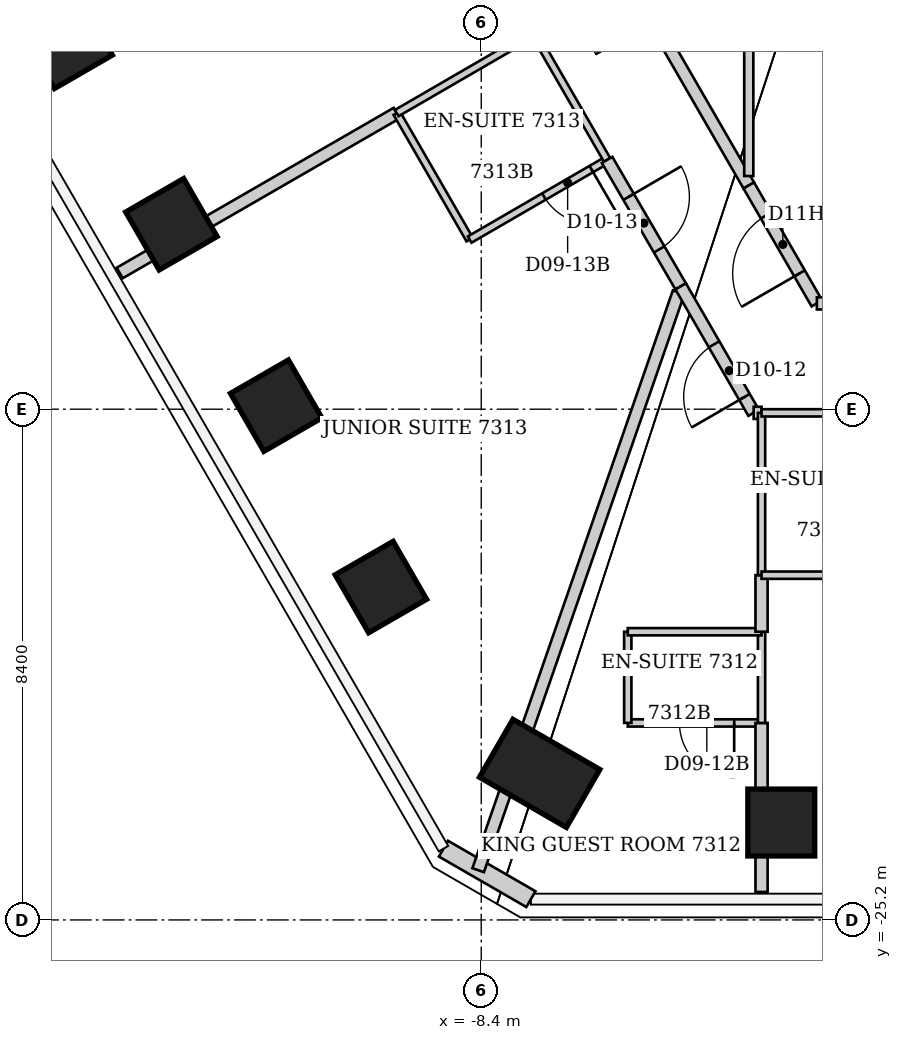
"""IFC4 building model, lengths in metres.
Left out: names, types, materials, properties, quantities, classifications, styles, units other than length and angle.
Written with IfcOpenShell. Run it as: python <this file> out.ifc"""

import sys

from ifc_helpers import new_model, si_unit, direction, frame, frame_2d, origin, origin_2d, place, context, subcontext, project, spatial, rectangle, extrude, element, fill, save


model = new_model("IFC4")
c1 = context("Model", 3, precision=1e-05, world=origin(), true_north=direction((0.0, 1.0)))
c2 = subcontext(c1, "Body", "Model", "MODEL_VIEW")
j1 = project(units=[si_unit("LENGTHUNIT", "METRE"), si_unit("PLANEANGLEUNIT", "RADIAN")], contexts=[c1])
p1 = place(None, origin())
s1 = spatial("IfcSite", under=j1, at=p1, CompositionType="ELEMENT")
p2 = place(p1, origin())
s2 = spatial("IfcBuilding", under=s1, at=p2, CompositionType="ELEMENT")
p3 = place(p2, frame((0.0, 0.0, 291.2)))
s3 = spatial("IfcBuildingStorey", under=s2, at=p3, CompositionType="ELEMENT", Elevation=291.2)
p4 = place(p3, frame((-3.466, -23.598, 0.0), z_axis=(0.0, 0.0, 1.0), x_axis=(0.0, -1.0, 0.0)))
e1 = element("IfcColumn", 1, at=p4, inside=s3, PredefinedType="COLUMN", context=c2, shape_type="SweptSolid", body=[
    extrude(rectangle(XDim=1.1, YDim=1.1, at=origin_2d()), origin(), (0.0, 0.0, 1.0), 3.8),
])
p5 = place(p3, frame((-7.439, -22.79, 0.0), z_axis=(0.0, 0.0, 1.0), x_axis=(-0.5, -0.866025403784, 0.0)))
e2 = element("IfcColumn", 2, at=p5, inside=s3, PredefinedType="COLUMN", context=c2, shape_type="SweptSolid", body=[
    extrude(rectangle(XDim=1.1, YDim=1.65, at=origin_2d()), origin(), (0.0, 0.0, 1.0), 3.8),
])
for number, where, z_axis, x_axis in (
    (3, (-10.05, -19.725, 0.0), (0.0, 0.0, 1.0), (-0.866, -0.5, 0.0)),
    (4, (-11.773, -16.742, 0.0), (0.0, 0.0, 1.0), (-0.866, -0.5, 0.0)),
    (5, (-13.495, -13.759, 0.0), (0.0, 0.0, 1.0), (-0.866, -0.5, 0.0)),
    (6, (-15.218, -10.775, 0.0), (0.0, 0.0, 1.0), (-0.866, -0.5, 0.0)),
):
    element("IfcColumn", number, at=place(p3, frame(where, z_axis=z_axis, x_axis=x_axis)), inside=s3, PredefinedType="COLUMN", context=c2, shape_type="SweptSolid", body=[
        extrude(rectangle(XDim=1.1, YDim=1.1, at=origin_2d()), origin(), (0.0, 0.0, 1.0), 3.8),
    ])
p6 = place(p3, frame((-7.583, -24.858, 0.0), z_axis=(0.0, 0.0, 1.0), x_axis=(-0.865989634427, 0.500061949227, 0.0)))
e7 = element("IfcWall", 7, at=p6, inside=s3, PredefinedType="SOLIDWALL", context=c2, shape_type="SweptSolid", body=[
    extrude(rectangle(XDim=1.66, YDim=0.3, at=frame_2d((0.83, 0.0))), origin(), (0.0, 0.0, 1.0), 3.64),
])
p7 = place(p3, frame((-14.346, -14.56, 0.0), z_axis=(0.0, 0.0, 1.0), x_axis=(0.8660557602, 0.49994741746, 0.0)))
e8 = element("IfcWall", 8, at=p7, inside=s3, PredefinedType="PARTITIONING", context=c2, shape_type="SweptSolid", body=[
    extrude(rectangle(XDim=5.261, YDim=0.2, at=frame_2d((2.63, 0.0))), origin(), (0.0, 0.0, 1.0), 3.64),
])
p8 = place(p3, frame((-9.79, -11.93, 0.0), z_axis=(0.0, 0.0, 1.0), x_axis=(0.499693115345, -0.866202511239, 0.0)))
e9 = element("IfcWall", 9, at=p8, inside=s3, PredefinedType="PARTITIONING", context=c2, shape_type="SweptSolid", body=[
    extrude(rectangle(XDim=2.401, YDim=0.12, at=frame_2d((1.201, 0.0))), origin(), (0.0, 0.0, 1.0), 3.64),
])
p9 = place(p3, frame((-9.79, -11.93, 0.0), z_axis=(0.0, 0.0, 1.0), x_axis=(0.865195830568, 0.501434118073, 0.0)))
e10 = element("IfcWall", 10, at=p9, inside=s3, PredefinedType="PARTITIONING", context=c2, shape_type="SweptSolid", body=[
    extrude(rectangle(XDim=2.612, YDim=0.12, at=frame_2d((1.306, 0.0))), origin(), (0.0, 0.0, 1.0), 3.64),
])
p10 = place(p3, frame((-8.59, -14.01, 0.0), z_axis=(0.0, 0.0, 1.0), x_axis=(0.865155281359, 0.50150407689, 0.0)))
e11 = element("IfcWall", 11, at=p10, inside=s3, PredefinedType="PARTITIONING", context=c2, shape_type="SweptSolid", body=[
    extrude(rectangle(XDim=2.612, YDim=0.12, at=frame_2d((1.306, 0.0))), origin(), (0.0, 0.0, 1.0), 3.64),
])
p11 = place(p10, frame((1.412, 0.0, 0.0)))
e12 = element("IfcOpeningElement", 12, at=p11, cuts=e11, PredefinedType="OPENING", context=c2, shape_type="SweptSolid", body=[
    extrude(rectangle(XDim=0.9, YDim=2.03, at=frame_2d((0.45, 1.015))), frame((0.0, 0.06, 0.0), z_axis=(0.0, -1.0, 0.0), x_axis=(1.0, 0.0, 0.0)), (0.0, 0.0, 1.0), 0.12),
])
p12 = place(p3, frame((-8.45, -24.382, 0.0), z_axis=(0.0, 0.0, 1.0), x_axis=(0.327695764917, 0.944783300898, 0.0)))
e13 = element("IfcWall", 13, at=p12, inside=s3, PredefinedType="PARTITIONING", context=c2, shape_type="SweptSolid", body=[
    extrude(rectangle(XDim=10.058, YDim=0.2, at=frame_2d((5.029, 0.0))), origin(), (0.0, 0.0, 1.0), 3.64),
])
p13 = place(p3, frame((-7.53, -10.62, 0.0), z_axis=(0.0, 0.0, 1.0), x_axis=(0.499737123639, -0.866177122335, 0.0)))
e14 = element("IfcWall", 14, at=p13, inside=s3, PredefinedType="PARTITIONING", context=c2, shape_type="SweptSolid", body=[
    extrude(rectangle(XDim=2.401, YDim=0.12, at=frame_2d((1.201, 0.0))), origin(), (0.0, 0.0, 1.0), 3.64),
])
p14 = place(p3, frame((-6.33, -12.7, 0.0), z_axis=(0.0, 0.0, 1.0), x_axis=(0.502810888564, -0.864396442809, 0.0)))
e15 = element("IfcWall", 15, at=p14, inside=s3, PredefinedType="PARTITIONING", context=c2, shape_type="SweptSolid", body=[
    extrude(rectangle(XDim=2.406, YDim=0.2, at=frame_2d((1.203, 0.0))), origin(), (0.0, 0.0, 1.0), 3.64),
])
p15 = place(p14, frame((0.703, 0.0, 0.0)))
e16 = element("IfcOpeningElement", 16, at=p15, cuts=e15, PredefinedType="OPENING", context=c2, shape_type="SweptSolid", body=[
    extrude(rectangle(XDim=1.0, YDim=2.13, at=frame_2d((0.5, 1.065))), frame((0.0, 0.1, 0.0), z_axis=(0.0, -1.0, 0.0), x_axis=(1.0, 0.0, 0.0)), (0.0, 0.0, 1.0), 0.2),
])
p16 = place(p3, frame((-5.99, -21.96, 0.0), z_axis=(0.0, 0.0, 1.0), x_axis=(1.0, 0.0, 0.0)))
e17 = element("IfcWall", 17, at=p16, inside=s3, PredefinedType="PARTITIONING", context=c2, shape_type="SweptSolid", body=[
    extrude(rectangle(XDim=2.2, YDim=0.12, at=frame_2d((1.1, 0.0))), origin(), (0.0, 0.0, 1.0), 3.64),
])
p17 = place(p16, frame((0.85, 0.0, 0.0)))
e18 = element("IfcOpeningElement", 18, at=p17, cuts=e17, PredefinedType="OPENING", context=c2, shape_type="SweptSolid", body=[
    extrude(rectangle(XDim=0.9, YDim=2.03, at=frame_2d((0.45, 1.015))), frame((0.0, 0.06, 0.0), z_axis=(0.0, -1.0, 0.0), x_axis=(1.0, 0.0, 0.0)), (0.0, 0.0, 1.0), 0.12),
])
p18 = place(p3, frame((-5.99, -20.46, 0.0), z_axis=(0.0, 0.0, 1.0), x_axis=(0.0, -1.0, 0.0)))
e19 = element("IfcWall", 19, at=p18, inside=s3, PredefinedType="PARTITIONING", context=c2, shape_type="SweptSolid", body=[
    extrude(rectangle(XDim=1.5, YDim=0.12, at=frame_2d((0.75, 0.0))), origin(), (0.0, 0.0, 1.0), 3.64),
])
p19 = place(p3, frame((-5.12, -14.78, 0.0), z_axis=(0.0, 0.0, 1.0), x_axis=(0.499813401482, -0.866133109688, 0.0)))
e20 = element("IfcWall", 20, at=p19, inside=s3, PredefinedType="PARTITIONING", context=c2, shape_type="SweptSolid", body=[
    extrude(rectangle(XDim=2.401, YDim=0.2, at=frame_2d((1.201, 0.0))), origin(), (0.0, 0.0, 1.0), 3.64),
])
p20 = place(p19, frame((1.1, 0.0, 0.0)))
e21 = element("IfcOpeningElement", 21, at=p20, cuts=e20, PredefinedType="OPENING", context=c2, shape_type="SweptSolid", body=[
    extrude(rectangle(XDim=1.0, YDim=2.13, at=frame_2d((0.5, 1.065))), frame((0.0, 0.1, 0.0), z_axis=(0.0, -1.0, 0.0), x_axis=(1.0, 0.0, 0.0)), (0.0, 0.0, 1.0), 0.2),
])
p21 = place(p3, frame((-4.0, -13.12, 0.0), z_axis=(0.0, 0.0, 1.0), x_axis=(-0.500218436225, 0.865899252835, 0.0)))
e22 = element("IfcWall", 22, at=p21, inside=s3, PredefinedType="PARTITIONING", context=c2, shape_type="SweptSolid", body=[
    extrude(rectangle(XDim=7.357, YDim=0.2, at=frame_2d((3.678, 0.0))), origin(), (0.0, 0.0, 1.0), 3.64),
])
p22 = place(p21, frame((3.128, 0.0, 0.0)))
e23 = element("IfcOpeningElement", 23, at=p22, cuts=e22, PredefinedType="OPENING", context=c2, shape_type="SweptSolid", body=[
    extrude(rectangle(XDim=1.1, YDim=2.2, at=frame_2d((0.55, 1.1))), frame((0.0, 0.1, 0.0), z_axis=(0.0, -1.0, 0.0), x_axis=(1.0, 0.0, 0.0)), (0.0, 0.0, 1.0), 0.2),
])
p23 = place(p3, frame((-4.0, -6.7, 0.0), z_axis=(0.0, 0.0, 1.0), x_axis=(0.0, -1.0, 0.0)))
e24 = element("IfcWall", 24, at=p23, inside=s3, PredefinedType="PARTITIONING", context=c2, shape_type="SweptSolid", body=[
    extrude(rectangle(XDim=6.265, YDim=0.15, at=frame_2d((3.133, 0.0))), origin(), (0.0, 0.0, 1.0), 3.64),
])
p24 = place(p3, frame((-3.92, -16.86, 0.0), z_axis=(0.0, 0.0, 1.0), x_axis=(1.0, 0.0, 0.0)))
e25 = element("IfcWall", 25, at=p24, inside=s3, PredefinedType="PARTITIONING", context=c2, shape_type="SweptSolid", body=[
    extrude(rectangle(XDim=0.13, YDim=0.2, at=frame_2d((0.065, 0.0))), origin(), (0.0, 0.0, 1.0), 3.64),
])
p25 = place(p3, frame((-3.79, -24.74, 0.0), z_axis=(0.0, 0.0, 1.0), x_axis=(0.0, 1.0, 0.0)))
e26 = element("IfcWall", 26, at=p25, inside=s3, PredefinedType="PARTITIONING", context=c2, shape_type="SweptSolid", body=[
    extrude(rectangle(XDim=2.78, YDim=0.2, at=frame_2d((1.39, 0.0))), origin(), (0.0, 0.0, 1.0), 3.64),
])
p26 = place(p3, frame((-3.79, -21.96, 0.0), z_axis=(0.0, 0.0, 1.0), x_axis=(0.0, 1.0, 0.0)))
e27 = element("IfcWall", 27, at=p26, inside=s3, PredefinedType="PARTITIONING", context=c2, shape_type="SweptSolid", body=[
    extrude(rectangle(XDim=1.5, YDim=0.12, at=frame_2d((0.75, 0.0))), origin(), (0.0, 0.0, 1.0), 3.64),
])
p27 = place(p3, frame((-3.79, -20.46, 0.0), z_axis=(0.0, 0.0, 1.0), x_axis=(-1.0, 0.0, 0.0)))
e28 = element("IfcWall", 28, at=p27, inside=s3, PredefinedType="PARTITIONING", context=c2, shape_type="SweptSolid", body=[
    extrude(rectangle(XDim=2.2, YDim=0.12, at=frame_2d((1.1, 0.0))), origin(), (0.0, 0.0, 1.0), 3.64),
])
p28 = place(p3, frame((-3.79, -20.46, 0.0), z_axis=(0.0, 0.0, 1.0), x_axis=(0.0, 1.0, 0.0)))
e29 = element("IfcWall", 29, at=p28, inside=s3, PredefinedType="PARTITIONING", context=c2, shape_type="SweptSolid", body=[
    extrude(rectangle(XDim=0.93, YDim=0.2, at=frame_2d((0.465, 0.0))), origin(), (0.0, 0.0, 1.0), 3.64),
])
p29 = place(p3, frame((-3.79, -19.53, 0.0), z_axis=(0.0, 0.0, 1.0), x_axis=(0.0, 1.0, 0.0)))
e30 = element("IfcWall", 30, at=p29, inside=s3, PredefinedType="PARTITIONING", context=c2, shape_type="SweptSolid", body=[
    extrude(rectangle(XDim=2.67, YDim=0.12, at=frame_2d((1.335, 0.0))), origin(), (0.0, 0.0, 1.0), 3.64),
])
for number, where, z_axis, x_axis in (
    (31, (-3.79, -19.53, 0.0), (0.0, 0.0, 1.0), (1.0, 0.0, 0.0)),
    (32, (-3.79, -16.86, 0.0), (0.0, 0.0, 1.0), (1.0, 0.0, 0.0)),
):
    element("IfcWall", number, at=place(p3, frame(where, z_axis=z_axis, x_axis=x_axis)), inside=s3, PredefinedType="PARTITIONING", context=c2, shape_type="SweptSolid", body=[
        extrude(rectangle(XDim=2.45, YDim=0.12, at=frame_2d((1.225, 0.0))), origin(), (0.0, 0.0, 1.0), 3.64),
    ])
p30 = place(p3, frame((-2.88, -15.06, 0.0), z_axis=(0.0, 0.0, 1.0), x_axis=(-0.499983441833, 0.866034963436, 0.0)))
e33 = element("IfcWall", 33, at=p30, inside=s3, PredefinedType="PARTITIONING", context=c2, shape_type="SweptSolid", body=[
    extrude(rectangle(XDim=2.24, YDim=0.2, at=frame_2d((1.12, 0.0))), origin(), (0.0, 0.0, 1.0), 3.64),
])
p31 = place(p30, frame((0.57, 0.0, 0.0)))
e34 = element("IfcOpeningElement", 34, at=p31, cuts=e33, PredefinedType="OPENING", context=c2, shape_type="SweptSolid", body=[
    extrude(rectangle(XDim=1.1, YDim=2.2, at=frame_2d((0.55, 1.1))), frame((0.0, 0.1, 0.0), z_axis=(0.0, -1.0, 0.0), x_axis=(1.0, 0.0, 0.0)), (0.0, 0.0, 1.0), 0.2),
])
p32 = place(p3, frame((-1.2, -15.06, 0.0), z_axis=(0.0, 0.0, 1.0), x_axis=(-1.0, 0.0, 0.0)))
e35 = element("IfcWall", 35, at=p32, inside=s3, PredefinedType="PARTITIONING", context=c2, shape_type="SweptSolid", body=[
    extrude(rectangle(XDim=1.68, YDim=0.2, at=frame_2d((0.84, 0.0))), origin(), (0.0, 0.0, 1.0), 3.64),
])
p33 = place(p20, origin())
e36 = element("IfcDoor", 36, at=p33, inside=s3, OperationType="SINGLE_SWING_RIGHT", PredefinedType="DOOR", context=c2, shape_type="SweptSolid", body=[
    extrude(rectangle(XDim=1.0, YDim=2.13, at=frame_2d((0.5, 1.065))), frame((0.0, 0.025, 0.0), z_axis=(0.0, -1.0, 0.0), x_axis=(1.0, 0.0, 0.0)), (0.0, 0.0, 1.0), 0.05),
])
fill(e21, e36)
p34 = place(p17, origin())
e37 = element("IfcDoor", 37, at=p34, inside=s3, OperationType="SINGLE_SWING_RIGHT", PredefinedType="DOOR", context=c2, shape_type="SweptSolid", body=[
    extrude(rectangle(XDim=0.9, YDim=2.03, at=frame_2d((0.45, 1.015))), frame((0.0, 0.025, 0.0), z_axis=(0.0, -1.0, 0.0), x_axis=(1.0, 0.0, 0.0)), (0.0, 0.0, 1.0), 0.05),
])
fill(e18, e37)
p35 = place(p15, origin())
e38 = element("IfcDoor", 38, at=p35, inside=s3, OperationType="SINGLE_SWING_LEFT", PredefinedType="DOOR", context=c2, shape_type="SweptSolid", body=[
    extrude(rectangle(XDim=1.0, YDim=2.13, at=frame_2d((0.5, 1.065))), frame((0.0, 0.025, 0.0), z_axis=(0.0, -1.0, 0.0), x_axis=(1.0, 0.0, 0.0)), (0.0, 0.0, 1.0), 0.05),
])
fill(e16, e38)
p36 = place(p11, origin())
e39 = element("IfcDoor", 39, at=p36, inside=s3, OperationType="SINGLE_SWING_RIGHT", PredefinedType="DOOR", context=c2, shape_type="SweptSolid", body=[
    extrude(rectangle(XDim=0.9, YDim=2.03, at=frame_2d((0.45, 1.015))), frame((0.0, 0.025, 0.0), z_axis=(0.0, -1.0, 0.0), x_axis=(1.0, 0.0, 0.0)), (0.0, 0.0, 1.0), 0.05),
])
fill(e12, e39)
p37 = place(p31, origin())
e40 = element("IfcDoor", 40, at=p37, inside=s3, OperationType="SINGLE_SWING_LEFT", PredefinedType="DOOR", context=c2, shape_type="SweptSolid", body=[
    extrude(rectangle(XDim=1.1, YDim=2.2, at=frame_2d((0.55, 1.1))), frame((0.0, 0.025, 0.0), z_axis=(0.0, -1.0, 0.0), x_axis=(1.0, 0.0, 0.0)), (0.0, 0.0, 1.0), 0.05),
])
fill(e34, e40)
save(model, sys.argv[1])
